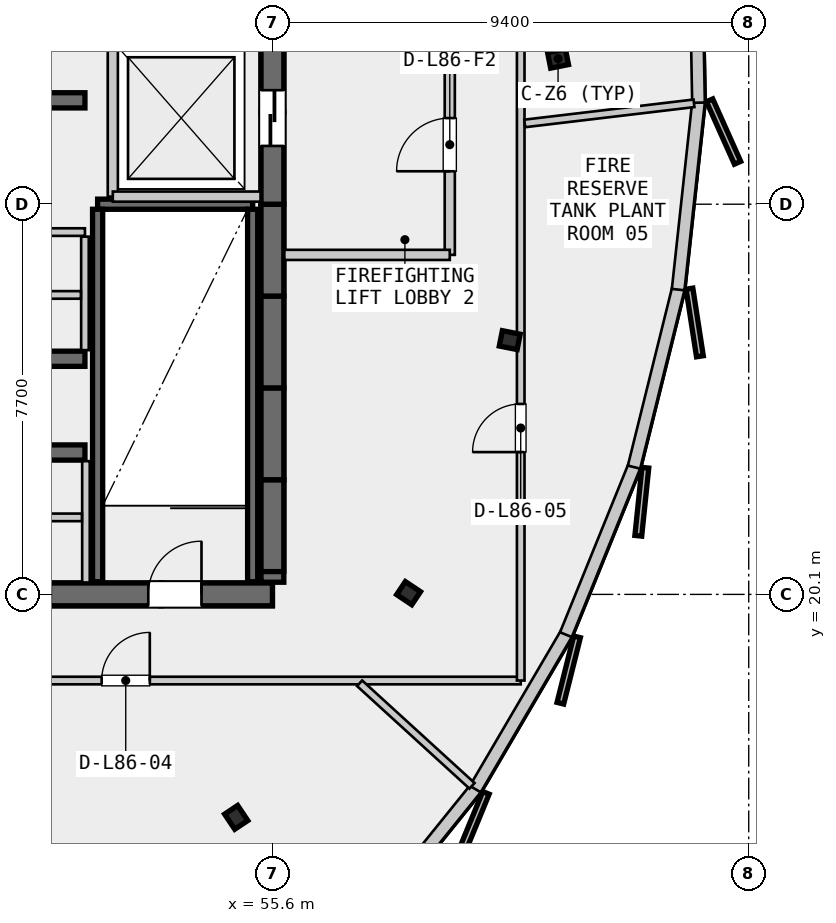
"""IFC4 building model, lengths in metres.
Left out: names, types, materials, properties, quantities, classifications, styles, units other than length and angle.
Written with IfcOpenShell. Run it as: python <this file> out.ifc"""

import sys

from ifc_helpers import new_model, si_unit, direction, frame, frame_2d, origin, origin_2d, place, context, subcontext, project, spatial, rectangle, i_section, extrude, source, transform, mapped, element, fill, save


model = new_model("IFC4")
c1 = context("Model", 3, precision=1e-05, world=origin(), true_north=direction((0.0, 1.0)))
c2 = subcontext(c1, "Body", "Model", "MODEL_VIEW")
j1 = project(units=[si_unit("LENGTHUNIT", "METRE"), si_unit("PLANEANGLEUNIT", "RADIAN")], contexts=[c1])
p1 = place(None, origin())
s1 = spatial("IfcSite", under=j1, at=p1, CompositionType="ELEMENT")
p2 = place(p1, origin())
s2 = spatial("IfcBuilding", under=s1, at=p2, CompositionType="ELEMENT")
p3 = place(p2, frame((0.0, 0.0, 324.3)))
s3 = spatial("IfcBuildingStorey", under=s2, at=p3, CompositionType="ELEMENT", Elevation=324.3)
p4 = place(p3, frame((38.0, 20.1, 0.0), z_axis=(0.0, 0.0, 1.0), x_axis=(1.0, 0.0, 0.0)))
e1 = element("IfcWall", 1, at=p4, inside=s3, PredefinedType="SHEAR", context=c2, shape_type="SweptSolid", body=[
    extrude(rectangle(XDim=17.6, YDim=0.45, at=frame_2d((8.8, 0.0))), origin(), (0.0, 0.0, 1.0), 4.2),
])
p5 = place(p4, frame((1.4, 0.0, 0.0)))
e2 = element("IfcOpeningElement", 2, at=p5, cuts=e1, PredefinedType="OPENING", context=c2, shape_type="SweptSolid", body=[
    extrude(rectangle(XDim=1.05, YDim=2.15, at=frame_2d((0.525, 1.075))), frame((0.0, 0.235, 0.0), z_axis=(0.0, -1.0, 0.0), x_axis=(1.0, 0.0, 0.0)), (0.0, 0.0, 1.0), 0.47),
])
p6 = place(p4, frame((15.15, 0.0, 0.0)))
e3 = element("IfcOpeningElement", 3, at=p6, cuts=e1, PredefinedType="OPENING", context=c2, shape_type="SweptSolid", body=[
    extrude(rectangle(XDim=1.05, YDim=2.15, at=frame_2d((0.525, 1.075))), frame((0.0, 0.235, 0.0), z_axis=(0.0, -1.0, 0.0), x_axis=(1.0, 0.0, 0.0)), (0.0, 0.0, 1.0), 0.47),
])
p7 = place(p4, frame((5.25, 0.0, 0.0)))
e4 = element("IfcOpeningElement", 4, at=p7, cuts=e1, PredefinedType="OPENING", context=c2, shape_type="SweptSolid", body=[
    extrude(rectangle(XDim=0.9, YDim=2.15, at=frame_2d((0.45, 1.075))), frame((0.0, 0.235, 0.0), z_axis=(0.0, -1.0, 0.0), x_axis=(1.0, 0.0, 0.0)), (0.0, 0.0, 1.0), 0.47),
])
p8 = place(p4, frame((11.4, 0.0, 0.0)))
e5 = element("IfcOpeningElement", 5, at=p8, cuts=e1, PredefinedType="OPENING", context=c2, shape_type="SweptSolid", body=[
    extrude(rectangle(XDim=0.95, YDim=2.15, at=frame_2d((0.475, 1.075))), frame((0.0, 0.235, 0.0), z_axis=(0.0, -1.0, 0.0), x_axis=(1.0, 0.0, 0.0)), (0.0, 0.0, 1.0), 0.47),
])
p9 = place(p3, frame((55.6, 20.34, 0.0), z_axis=(0.0, 0.0, 1.0), x_axis=(0.0, 1.0, 0.0)))
e6 = element("IfcWall", 6, at=p9, inside=s3, PredefinedType="SHEAR", context=c2, shape_type="SweptSolid", body=[
    extrude(rectangle(XDim=14.92, YDim=0.45, at=frame_2d((7.46, 0.0))), origin(), (0.0, 0.0, 1.0), 4.2),
])
p10 = place(p9, frame((12.71, 0.0, 0.0)))
e7 = element("IfcOpeningElement", 7, at=p10, cuts=e6, PredefinedType="OPENING", context=c2, shape_type="SweptSolid", body=[
    extrude(rectangle(XDim=1.05, YDim=2.15, at=frame_2d((0.525, 1.075))), frame((0.0, 0.235, 0.0), z_axis=(0.0, -1.0, 0.0), x_axis=(1.0, 0.0, 0.0)), (0.0, 0.0, 1.0), 0.47),
])
p11 = place(p9, frame((8.61, 0.0, 0.0)))
e8 = element("IfcOpeningElement", 8, at=p11, cuts=e6, PredefinedType="OPENING", context=c2, shape_type="SweptSolid", body=[
    extrude(rectangle(XDim=1.1, YDim=2.2, at=frame_2d((0.55, 1.1))), frame((0.0, 0.235, 0.0), z_axis=(0.0, -1.0, 0.0), x_axis=(1.0, 0.0, 0.0)), (0.0, 0.0, 1.0), 0.47),
])
p12 = place(p3, frame((47.65, 22.9, 0.0), z_axis=(0.0, 0.0, 1.0), x_axis=(1.0, 0.0, 0.0)))
e9 = element("IfcWall", 9, at=p12, inside=s3, PredefinedType="SHEAR", context=c2, shape_type="SweptSolid", body=[
    extrude(rectangle(XDim=4.25, YDim=0.3, at=frame_2d((2.125, 0.0))), origin(), (0.0, 0.0, 1.0), 4.2),
])
p13 = place(p3, frame((47.65, 24.75, 0.0), z_axis=(0.0, 0.0, 1.0), x_axis=(1.0, 0.0, 0.0)))
e10 = element("IfcWall", 10, at=p13, inside=s3, PredefinedType="SHEAR", context=c2, shape_type="SweptSolid", body=[
    extrude(rectangle(XDim=4.25, YDim=0.3, at=frame_2d((2.125, 0.0))), origin(), (0.0, 0.0, 1.0), 4.2),
])
p14 = place(p13, frame((1.55, 0.0, 0.0)))
e11 = element("IfcOpeningElement", 11, at=p14, cuts=e10, PredefinedType="OPENING", context=c2, shape_type="SweptSolid", body=[
    extrude(rectangle(XDim=0.95, YDim=2.15, at=frame_2d((0.475, 1.075))), frame((0.0, 0.16, 0.0), z_axis=(0.0, -1.0, 0.0), x_axis=(1.0, 0.0, 0.0)), (0.0, 0.0, 1.0), 0.32),
])
p15 = place(p3, frame((47.65, 29.85, 0.0), z_axis=(0.0, 0.0, 1.0), x_axis=(1.0, 0.0, 0.0)))
e12 = element("IfcWall", 12, at=p15, inside=s3, PredefinedType="SHEAR", context=c2, shape_type="SweptSolid", body=[
    extrude(rectangle(XDim=4.25, YDim=0.3, at=frame_2d((2.125, 0.0))), origin(), (0.0, 0.0, 1.0), 4.2),
])
m1 = source(origin(), c2, "Body", "SweptSolid", [
    extrude(i_section(OverallWidth=0.309, OverallDepth=0.359, WebThickness=0.016, FlangeThickness=0.026, FilletRadius=0.027, at=origin_2d()), origin(), (0.0, 0.0, 1.0), 9.131),
])
p16 = place(p3, frame((61.237, 30.672, 0.0), z_axis=(0.0, 0.0, 1.0), x_axis=(0.980785280403, 0.195090322016, 0.0)))
e13 = element("IfcColumn", 13, at=p16, inside=s3, PredefinedType="COLUMN", context=c2, shape_type="MappedRepresentation", body=[
    mapped(m1, transform((0.0, 0.0, 0.0), scale=1.0)),
])
m2 = source(origin(), c2, "Body", "SweptSolid", [
    extrude(i_section(OverallWidth=0.309, OverallDepth=0.359, WebThickness=0.016, FlangeThickness=0.026, FilletRadius=0.027, at=origin_2d()), origin(), (0.0, 0.0, 1.0), 6.133),
])
p17 = place(p3, frame((54.885, 15.7, 0.0), z_axis=(0.0, 0.0, 1.0), x_axis=(0.55557023302, -0.831469612303, 0.0)))
e14 = element("IfcColumn", 14, at=p17, inside=s3, PredefinedType="COLUMN", context=c2, shape_type="MappedRepresentation", body=[
    mapped(m2, transform((0.0, 0.0, 0.0), scale=1.0)),
])
m3 = source(origin(), c2, "Body", "SweptSolid", [
    extrude(i_section(OverallWidth=0.309, OverallDepth=0.359, WebThickness=0.016, FlangeThickness=0.026, FilletRadius=0.027, at=origin_2d()), origin(), (0.0, 0.0, 1.0), 7.106),
])
p18 = place(p3, frame((58.287, 20.125, 0.0), z_axis=(0.0, 0.0, 1.0), x_axis=(0.831469612303, -0.55557023302, 0.0)))
e15 = element("IfcColumn", 15, at=p18, inside=s3, PredefinedType="COLUMN", context=c2, shape_type="MappedRepresentation", body=[
    mapped(m3, transform((0.0, 0.0, 0.0), scale=1.0)),
])
m4 = source(origin(), c2, "Body", "SweptSolid", [
    extrude(i_section(OverallWidth=0.309, OverallDepth=0.359, WebThickness=0.016, FlangeThickness=0.026, FilletRadius=0.027, at=origin_2d()), origin(), (0.0, 0.0, 1.0), 8.099),
])
p19 = place(p3, frame((60.284, 25.118, 0.0), z_axis=(0.0, 0.0, 1.0), x_axis=(0.980785280403, -0.195090322016, 0.0)))
e16 = element("IfcColumn", 16, at=p19, inside=s3, PredefinedType="COLUMN", context=c2, shape_type="MappedRepresentation", body=[
    mapped(m4, transform((0.0, 0.0, 0.0), scale=1.0)),
])
p20 = place(p3, frame((51.2, 20.1, 4.2), z_axis=(0.0, 0.0, 1.0), x_axis=(1.0, 0.0, 0.0)))
e17 = element("IfcWall", 17, at=p20, inside=s3, PredefinedType="SHEAR", context=c2, shape_type="SweptSolid", body=[
    extrude(rectangle(XDim=2.2, YDim=0.45, at=frame_2d((1.1, 0.0))), origin(), (0.0, 0.0, 1.0), 2.507),
])
p21 = place(p3, frame((53.4, 20.1, 4.2), z_axis=(0.0, 0.0, 1.0), x_axis=(1.0, 0.0, 0.0)))
e18 = element("IfcWall", 18, at=p21, inside=s3, PredefinedType="SHEAR", context=c2, shape_type="SweptSolid", body=[
    extrude(rectangle(XDim=2.2, YDim=0.45, at=frame_2d((1.1, 0.0))), origin(), (0.0, 0.0, 1.0), 2.633),
])
p22 = place(p3, frame((55.6, 20.55, 4.2), z_axis=(0.0, 0.0, 1.0), x_axis=(0.0, 1.0, 0.0)))
e19 = element("IfcWall", 19, at=p22, inside=s3, PredefinedType="SHEAR", context=c2, shape_type="SweptSolid", body=[
    extrude(rectangle(XDim=1.812, YDim=0.45, at=frame_2d((0.906, 0.0))), origin(), (0.0, 0.0, 1.0), 2.837),
])
p23 = place(p3, frame((55.6, 22.363, 4.2), z_axis=(0.0, 0.0, 1.0), x_axis=(0.0, 1.0, 0.0)))
e20 = element("IfcWall", 20, at=p23, inside=s3, PredefinedType="SHEAR", context=c2, shape_type="SweptSolid", body=[
    extrude(rectangle(XDim=1.812, YDim=0.45, at=frame_2d((0.906, 0.0))), origin(), (0.0, 0.0, 1.0), 3.156),
])
p24 = place(p3, frame((55.6, 24.175, 4.2), z_axis=(0.0, 0.0, 1.0), x_axis=(0.0, 1.0, 0.0)))
e21 = element("IfcWall", 21, at=p24, inside=s3, PredefinedType="SHEAR", context=c2, shape_type="SweptSolid", body=[
    extrude(rectangle(XDim=1.812, YDim=0.45, at=frame_2d((0.906, 0.0))), origin(), (0.0, 0.0, 1.0), 3.475),
])
p25 = place(p3, frame((55.6, 25.988, 4.2), z_axis=(0.0, 0.0, 1.0), x_axis=(0.0, 1.0, 0.0)))
e22 = element("IfcWall", 22, at=p25, inside=s3, PredefinedType="SHEAR", context=c2, shape_type="SweptSolid", body=[
    extrude(rectangle(XDim=1.812, YDim=0.45, at=frame_2d((0.906, 0.0))), origin(), (0.0, 0.0, 1.0), 3.794),
])
p26 = place(p3, frame((55.6, 27.8, 4.2), z_axis=(0.0, 0.0, 1.0), x_axis=(0.0, 1.0, 0.0)))
e23 = element("IfcWall", 23, at=p26, inside=s3, PredefinedType="SHEAR", context=c2, shape_type="SweptSolid", body=[
    extrude(rectangle(XDim=1.812, YDim=0.45, at=frame_2d((0.906, 0.0))), origin(), (0.0, 0.0, 1.0), 4.113),
])
p27 = place(p3, frame((55.6, 29.613, 4.2), z_axis=(0.0, 0.0, 1.0), x_axis=(0.0, 1.0, 0.0)))
e24 = element("IfcWall", 24, at=p27, inside=s3, PredefinedType="SHEAR", context=c2, shape_type="SweptSolid", body=[
    extrude(rectangle(XDim=1.812, YDim=0.45, at=frame_2d((0.906, 0.0))), origin(), (0.0, 0.0, 1.0), 4.432),
])
p28 = place(p3, frame((57.425, 13.563, 5.903), z_axis=(0.0, 0.0, 1.0), x_axis=(0.628232778482, 0.778025434058, 0.0)))
e25 = element("IfcWall", 25, at=p28, inside=s3, PredefinedType="PARAPET", context=c2, shape_type="SweptSolid", body=[
    extrude(rectangle(XDim=3.486, YDim=0.25, at=frame_2d((1.743, 0.0))), origin(), (0.0, 0.0, 1.0), 0.321),
])
p29 = place(p3, frame((59.603, 16.258, 6.506), z_axis=(0.0, 0.0, 1.0), x_axis=(0.505932830003, 0.862572878964, 0.0)))
e26 = element("IfcWall", 26, at=p29, inside=s3, PredefinedType="PARAPET", context=c2, shape_type="SweptSolid", body=[
    extrude(rectangle(XDim=3.553, YDim=0.25, at=frame_2d((1.777, 0.0))), origin(), (0.0, 0.0, 1.0), 0.341),
])
p30 = place(p3, frame((61.392, 19.305, 7.148), z_axis=(0.0, 0.0, 1.0), x_axis=(0.376252965599, 0.926516975494, 0.0)))
e27 = element("IfcWall", 27, at=p30, inside=s3, PredefinedType="PARAPET", context=c2, shape_type="SweptSolid", body=[
    extrude(rectangle(XDim=3.589, YDim=0.25, at=frame_2d((1.794, 0.0))), origin(), (0.0, 0.0, 1.0), 0.351),
])
p31 = place(p3, frame((62.736, 22.612, 7.81), z_axis=(0.0, 0.0, 1.0), x_axis=(0.240920629771, 0.970544821299, 0.0)))
e28 = element("IfcWall", 28, at=p31, inside=s3, PredefinedType="PARAPET", context=c2, shape_type="SweptSolid", body=[
    extrude(rectangle(XDim=3.629, YDim=0.25, at=frame_2d((1.814, 0.0))), origin(), (0.0, 0.0, 1.0), 0.355),
])
p32 = place(p3, frame((63.607, 26.115, 8.48), z_axis=(0.0, 0.0, 1.0), x_axis=(0.107980393633, 0.99415302373, 0.0)))
e29 = element("IfcWall", 29, at=p32, inside=s3, PredefinedType="PARAPET", context=c2, shape_type="SweptSolid", body=[
    extrude(rectangle(XDim=3.728, YDim=0.25, at=frame_2d((1.864, 0.0))), origin(), (0.0, 0.0, 1.0), 0.357),
])
p33 = place(p3, frame((64.009, 29.804, 9.155), z_axis=(0.0, 0.0, 1.0), x_axis=(-0.018444210135, 0.999829891088, 0.0)))
e30 = element("IfcWall", 30, at=p33, inside=s3, PredefinedType="PARAPET", context=c2, shape_type="SweptSolid", body=[
    extrude(rectangle(XDim=3.812, YDim=0.25, at=frame_2d((1.906, 0.0))), origin(), (0.0, 0.0, 1.0), 0.353),
])
p34 = place(p3, frame((52.15, 27.8, 0.0), z_axis=(0.0, 0.0, 1.0), x_axis=(1.0, 0.0, 0.0)))
e31 = element("IfcWall", 31, at=p34, inside=s3, PredefinedType="SHEAR", context=c2, shape_type="SweptSolid", body=[
    extrude(rectangle(XDim=3.06, YDim=0.2, at=frame_2d((1.53, 0.0))), origin(), (0.0, 0.0, 1.0), 4.2),
])
for number, where, z_axis, x_axis in (
    (32, (55.21, 27.7, 0.0), (0.0, 0.0, 1.0), (0.0, -1.0, 0.0)),
    (33, (52.15, 20.35, 0.0), (0.0, 0.0, 1.0), (0.0, 1.0, 0.0)),
):
    element("IfcWall", number, at=place(p3, frame(where, z_axis=z_axis, x_axis=x_axis)), inside=s3, PredefinedType="SHEAR", context=c2, shape_type="SweptSolid", body=[
        extrude(rectangle(XDim=7.35, YDim=0.2, at=frame_2d((3.675, 0.0))), origin(), (0.0, 0.0, 1.0), 4.2),
    ])
p35 = place(p3, frame((52.45, 27.95, 0.0), z_axis=(0.0, 0.0, 1.0), x_axis=(0.0, 1.0, 0.0)))
e34 = element("IfcWall", 34, at=p35, inside=s3, PredefinedType="PARTITIONING", context=c2, shape_type="SweptSolid", body=[
    extrude(rectangle(XDim=3.1, YDim=0.2, at=frame_2d((1.55, 0.0))), origin(), (0.0, 0.0, 1.0), 2.76),
])
p36 = place(p3, frame((52.45, 27.95, 0.0), z_axis=(0.0, 0.0, 1.0), x_axis=(1.0, 0.0, 0.0)))
e35 = element("IfcWall", 35, at=p36, inside=s3, PredefinedType="PARTITIONING", context=c2, shape_type="SweptSolid", body=[
    extrude(rectangle(XDim=2.915, YDim=0.2, at=frame_2d((1.458, 0.0))), origin(), (0.0, 0.0, 1.0), 3.49),
])
p37 = place(p3, frame((59.1, 26.8, 0.0), z_axis=(0.0, 0.0, 1.0), x_axis=(0.0, 1.0, 0.0)))
e36 = element("IfcWall", 36, at=p37, inside=s3, PredefinedType="PARTITIONING", context=c2, shape_type="SweptSolid", body=[
    extrude(rectangle(XDim=4.4, YDim=0.2, at=frame_2d((2.2, 0.0))), origin(), (0.0, 0.0, 1.0), 3.49),
])
p38 = place(p37, frame((1.65, 0.0, 0.0)))
e37 = element("IfcOpeningElement", 37, at=p38, cuts=e36, PredefinedType="OPENING", context=c2, shape_type="SweptSolid", body=[
    extrude(rectangle(XDim=1.05, YDim=2.15, at=frame_2d((0.525, 1.075))), frame((0.0, 0.11, 0.0), z_axis=(0.0, -1.0, 0.0), x_axis=(1.0, 0.0, 0.0)), (0.0, 0.0, 1.0), 0.22),
])
p39 = place(p3, frame((55.835, 26.8, 0.0), z_axis=(0.0, 0.0, 1.0), x_axis=(1.0, 0.0, 0.0)))
e38 = element("IfcWall", 38, at=p39, inside=s3, PredefinedType="PARTITIONING", context=c2, shape_type="SweptSolid", body=[
    extrude(rectangle(XDim=3.265, YDim=0.2, at=frame_2d((1.633, 0.0))), origin(), (0.0, 0.0, 1.0), 3.49),
])
p40 = place(p3, frame((51.92, 20.335, 0.0), z_axis=(0.0, 0.0, 1.0), x_axis=(0.0, 1.0, 0.0)))
e39 = element("IfcWall", 39, at=p40, inside=s3, PredefinedType="PARTITIONING", context=c2, shape_type="SweptSolid", body=[
    extrude(rectangle(XDim=2.395, YDim=0.15, at=frame_2d((1.198, 0.0))), origin(), (0.0, 0.0, 1.0), 3.49),
])
p41 = place(p3, frame((47.88, 21.62, 0.0), z_axis=(0.0, 0.0, 1.0), x_axis=(1.0, 0.0, 0.0)))
e40 = element("IfcWall", 40, at=p41, inside=s3, PredefinedType="PARTITIONING", context=c2, shape_type="SweptSolid", body=[
    extrude(rectangle(XDim=3.96, YDim=0.15, at=frame_2d((1.98, 0.0))), origin(), (0.0, 0.0, 1.0), 2.76),
])
p42 = place(p41, frame((1.55, 0.0, 0.0)))
e41 = element("IfcOpeningElement", 41, at=p42, cuts=e40, PredefinedType="OPENING", context=c2, shape_type="SweptSolid", body=[
    extrude(rectangle(XDim=0.85, YDim=2.15, at=frame_2d((0.425, 1.075))), frame((0.0, 0.085, 0.0), z_axis=(0.0, -1.0, 0.0), x_axis=(1.0, 0.0, 0.0)), (0.0, 0.0, 1.0), 0.17),
])
p43 = place(p3, frame((47.65, 27.25, 0.0), z_axis=(0.0, 0.0, 1.0), x_axis=(1.0, 0.0, 0.0)))
e42 = element("IfcWall", 42, at=p43, inside=s3, PredefinedType="PARTITIONING", context=c2, shape_type="SweptSolid", body=[
    extrude(rectangle(XDim=4.25, YDim=0.15, at=frame_2d((2.125, 0.0))), origin(), (0.0, 0.0, 1.0), 2.76),
])
p44 = place(p3, frame((51.9, 24.92, 0.0), z_axis=(0.0, 0.0, 1.0), x_axis=(0.0, 1.0, 0.0)))
e43 = element("IfcWall", 43, at=p44, inside=s3, PredefinedType="PARTITIONING", context=c2, shape_type="SweptSolid", body=[
    extrude(rectangle(XDim=2.24, YDim=0.15, at=frame_2d((1.12, 0.0))), origin(), (0.0, 0.0, 1.0), 2.76),
])
p45 = place(p3, frame((47.73, 26.01, 0.0), z_axis=(0.0, 0.0, 1.0), x_axis=(1.0, 0.0, 0.0)))
e44 = element("IfcWall", 44, at=p45, inside=s3, PredefinedType="PARTITIONING", context=c2, shape_type="SweptSolid", body=[
    extrude(rectangle(XDim=4.09, YDim=0.15, at=frame_2d((2.045, 0.0))), origin(), (0.0, 0.0, 1.0), 2.76),
])
p46 = place(p45, frame((1.6, 0.0, 0.0)))
e45 = element("IfcOpeningElement", 45, at=p46, cuts=e44, PredefinedType="OPENING", context=c2, shape_type="SweptSolid", body=[
    extrude(rectangle(XDim=0.85, YDim=2.15, at=frame_2d((0.425, 1.075))), frame((0.0, 0.085, 0.0), z_axis=(0.0, -1.0, 0.0), x_axis=(1.0, 0.0, 0.0)), (0.0, 0.0, 1.0), 0.17),
])
p47 = place(p3, frame((33.1, 18.4, 0.0), z_axis=(0.0, 0.0, 1.0), x_axis=(1.0, 0.0, 0.0)))
e46 = element("IfcWall", 46, at=p47, inside=s3, PredefinedType="PARTITIONING", context=c2, shape_type="SweptSolid", body=[
    extrude(rectangle(XDim=27.4, YDim=0.15, at=frame_2d((13.7, 0.0))), origin(), (0.0, 0.0, 1.0), 3.49),
])
p48 = place(p47, frame((4.35, 0.0, 0.0)))
e47 = element("IfcOpeningElement", 47, at=p48, cuts=e46, PredefinedType="OPENING", context=c2, shape_type="SweptSolid", body=[
    extrude(rectangle(XDim=0.95, YDim=2.15, at=frame_2d((0.475, 1.075))), frame((0.0, 0.085, 0.0), z_axis=(0.0, -1.0, 0.0), x_axis=(1.0, 0.0, 0.0)), (0.0, 0.0, 1.0), 0.17),
])
p49 = place(p47, frame((11.499, 0.0, 0.0)))
e48 = element("IfcOpeningElement", 48, at=p49, cuts=e46, PredefinedType="OPENING", context=c2, shape_type="SweptSolid", body=[
    extrude(rectangle(XDim=0.95, YDim=2.15, at=frame_2d((0.475, 1.075))), frame((0.0, 0.085, 0.0), z_axis=(0.0, -1.0, 0.0), x_axis=(1.0, 0.0, 0.0)), (0.0, 0.0, 1.0), 0.17),
])
p50 = place(p47, frame((19.13, 0.0, 0.0)))
e49 = element("IfcOpeningElement", 49, at=p50, cuts=e46, PredefinedType="OPENING", context=c2, shape_type="SweptSolid", body=[
    extrude(rectangle(XDim=0.95, YDim=2.15, at=frame_2d((0.475, 1.075))), frame((0.0, 0.085, 0.0), z_axis=(0.0, -1.0, 0.0), x_axis=(1.0, 0.0, 0.0)), (0.0, 0.0, 1.0), 0.17),
])
p51 = place(p3, frame((60.5, 18.4, 0.0), z_axis=(0.0, 0.0, 1.0), x_axis=(0.0, 1.0, 0.0)))
e50 = element("IfcWall", 50, at=p51, inside=s3, PredefinedType="PARTITIONING", context=c2, shape_type="SweptSolid", body=[
    extrude(rectangle(XDim=18.8, YDim=0.15, at=frame_2d((9.4, 0.0))), origin(), (0.0, 0.0, 1.0), 3.49),
])
p52 = place(p51, frame((4.508, 0.0, 0.0)))
e51 = element("IfcOpeningElement", 51, at=p52, cuts=e50, PredefinedType="OPENING", context=c2, shape_type="SweptSolid", body=[
    extrude(rectangle(XDim=0.95, YDim=2.15, at=frame_2d((0.475, 1.075))), frame((0.0, 0.085, 0.0), z_axis=(0.0, -1.0, 0.0), x_axis=(1.0, 0.0, 0.0)), (0.0, 0.0, 1.0), 0.17),
])
p53 = place(p51, frame((13.673, 0.0, 0.0)))
e52 = element("IfcOpeningElement", 52, at=p53, cuts=e50, PredefinedType="OPENING", context=c2, shape_type="SweptSolid", body=[
    extrude(rectangle(XDim=0.95, YDim=2.15, at=frame_2d((0.475, 1.075))), frame((0.0, 0.085, 0.0), z_axis=(0.0, -1.0, 0.0), x_axis=(1.0, 0.0, 0.0)), (0.0, 0.0, 1.0), 0.17),
])
p54 = place(p3, frame((57.321, 18.346, 0.0), z_axis=(0.0, 0.0, 1.0), x_axis=(0.738761763857, -0.673966658124, 0.0)))
e53 = element("IfcWall", 53, at=p54, inside=s3, PredefinedType="PARTITIONING", context=c2, shape_type="SweptSolid", body=[
    extrude(rectangle(XDim=3.003, YDim=0.15, at=frame_2d((1.501, 0.0))), origin(), (0.0, 0.0, 1.0), 3.49),
])
p55 = place(p3, frame((60.579, 29.394, 0.0), z_axis=(0.0, 0.0, 1.0), x_axis=(0.992996182228, 0.118146443373, 0.0)))
e54 = element("IfcWall", 54, at=p55, inside=s3, PredefinedType="PARTITIONING", context=c2, shape_type="SweptSolid", body=[
    extrude(rectangle(XDim=3.364, YDim=0.15, at=frame_2d((1.682, 0.0))), origin(), (0.0, 0.0, 1.0), 3.49),
])
m5 = source(origin(), c2, "Body", "SweptSolid", [
    extrude(rectangle(XDim=1.05, YDim=2.15, at=frame_2d((0.525, 1.075))), frame((0.0, 0.025, 0.0), z_axis=(0.0, -1.0, 0.0), x_axis=(1.0, 0.0, 0.0)), (0.0, 0.0, 1.0), 0.05),
])
p56 = place(p6, origin())
e55 = element("IfcDoor", 55, at=p56, inside=s3, OperationType="SINGLE_SWING_RIGHT", PredefinedType="DOOR", context=c2, shape_type="MappedRepresentation", body=[
    mapped(m5, transform((0.0, 0.0, 0.0), scale=1.0)),
])
fill(e3, e55)
m6 = source(origin(), c2, "Body", "SweptSolid", [
    extrude(rectangle(XDim=1.1, YDim=2.2, at=frame_2d((0.55, 1.1))), frame((0.0, 0.025, 0.0), z_axis=(0.0, -1.0, 0.0), x_axis=(1.0, 0.0, 0.0)), (0.0, 0.0, 1.0), 0.05),
])
p57 = place(p11, origin())
e56 = element("IfcDoor", 56, at=p57, inside=s3, OperationType="SLIDING_TO_RIGHT", PredefinedType="DOOR", context=c2, shape_type="MappedRepresentation", body=[
    mapped(m6, transform((0.0, 0.0, 0.0), scale=1.0)),
])
fill(e8, e56)
p58 = place(p38, origin())
e57 = element("IfcDoor", 57, at=p58, inside=s3, OperationType="SINGLE_SWING_LEFT", PredefinedType="DOOR", context=c2, shape_type="MappedRepresentation", body=[
    mapped(m5, transform((0.0, 0.0, 0.0), scale=1.0)),
])
fill(e37, e57)
m7 = source(origin(), c2, "Body", "SweptSolid", [
    extrude(rectangle(XDim=0.95, YDim=2.15, at=frame_2d((0.475, 1.075))), frame((0.0, 0.025, 0.0), z_axis=(0.0, -1.0, 0.0), x_axis=(1.0, 0.0, 0.0)), (0.0, 0.0, 1.0), 0.05),
])
p59 = place(p50, origin())
e58 = element("IfcDoor", 58, at=p59, inside=s3, OperationType="SINGLE_SWING_RIGHT", PredefinedType="DOOR", context=c2, shape_type="MappedRepresentation", body=[
    mapped(m7, transform((0.0, 0.0, 0.0), scale=1.0)),
])
fill(e49, e58)
p60 = place(p52, origin())
e59 = element("IfcDoor", 59, at=p60, inside=s3, OperationType="SINGLE_SWING_LEFT", PredefinedType="DOOR", context=c2, shape_type="MappedRepresentation", body=[
    mapped(m7, transform((0.0, 0.0, 0.0), scale=1.0)),
])
fill(e51, e59)
save(model, sys.argv[1])
